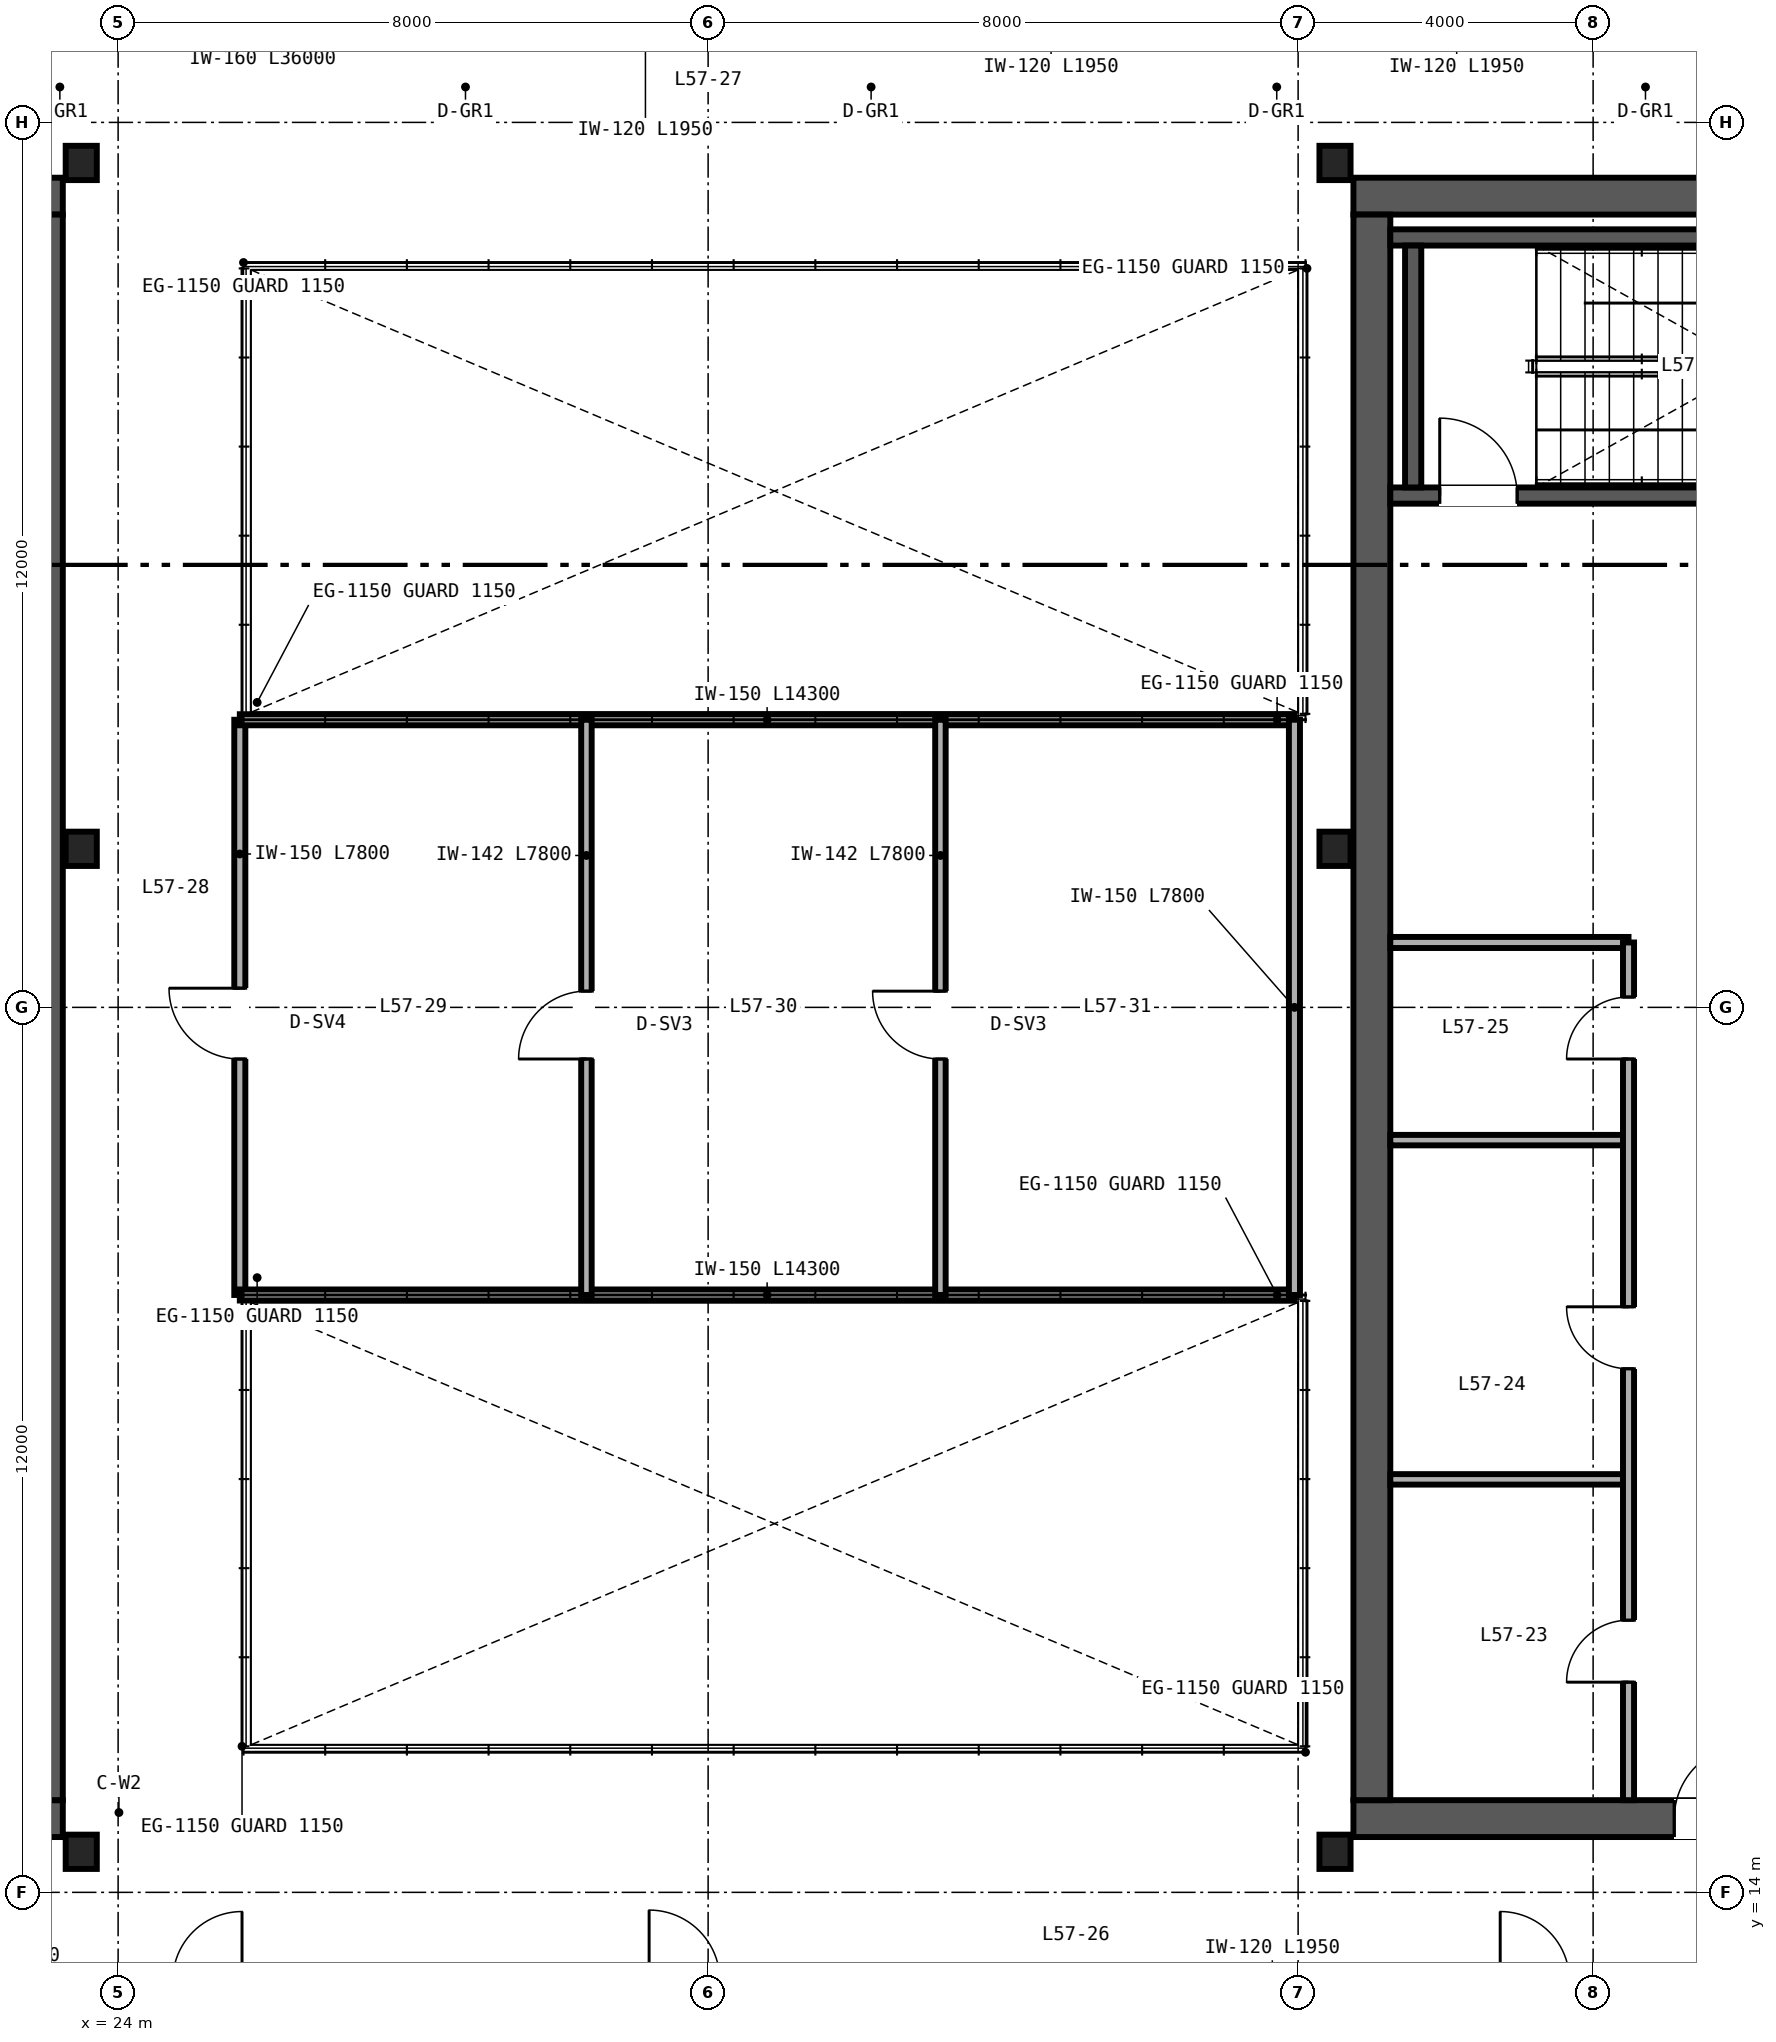
"""IFC4 building model, lengths in metres.
Left out: names, types, materials, properties, quantities, classifications, styles, units other than length and angle.
Written with IfcOpenShell. Run it as: python <this file> out.ifc"""

import sys

from ifc_helpers import new_model, si_unit, direction, frame, frame_2d, origin, origin_2d, place, context, subcontext, project, spatial, rectangle, i_section, extrude, source, transform, mapped, element, fill, save


model = new_model("IFC4")
c1 = context("Model", 3, precision=1e-05, world=origin(), true_north=direction((0.0, 1.0)))
c2 = subcontext(c1, "Body", "Model", "MODEL_VIEW")
j1 = project(units=[si_unit("LENGTHUNIT", "METRE"), si_unit("PLANEANGLEUNIT", "RADIAN")], contexts=[c1])
p1 = place(None, origin())
s1 = spatial("IfcSite", under=j1, at=p1, CompositionType="ELEMENT")
p2 = place(p1, origin())
s2 = spatial("IfcBuilding", under=s1, at=p2, CompositionType="ELEMENT")
p3 = place(p2, frame((0.0, 0.0, 228.0)))
s3 = spatial("IfcBuildingStorey", under=s2, at=p3, CompositionType="ELEMENT", Elevation=228.0)
p4 = place(p3, frame((10.75, 15.0, 0.0), z_axis=(0.0, 0.0, 1.0), x_axis=(1.0, 0.0, 0.0)))
e1 = element("IfcWall", 1, at=p4, inside=s3, PredefinedType="SHEAR", context=c2, shape_type="SweptSolid", body=[
    extrude(rectangle(XDim=12.5, YDim=0.5, at=frame_2d((6.25, 0.0))), origin(), (0.0, 0.0, 1.0), 4.58),
])
p5 = place(p4, frame((10.15, 0.0, 0.0)))
e2 = element("IfcOpeningElement", 2, at=p5, cuts=e1, PredefinedType="OPENING", context=c2, shape_type="SweptSolid", body=[
    extrude(rectangle(XDim=1.0, YDim=2.15, at=frame_2d((0.5, 1.075))), frame((0.0, 0.26, 0.0), z_axis=(0.0, -1.0, 0.0), x_axis=(1.0, 0.0, 0.0)), (0.0, 0.0, 1.0), 0.52),
])
p6 = place(p3, frame((10.75, 37.0, 0.0), z_axis=(0.0, 0.0, 1.0), x_axis=(1.0, 0.0, 0.0)))
e3 = element("IfcWall", 3, at=p6, inside=s3, PredefinedType="SHEAR", context=c2, shape_type="SweptSolid", body=[
    extrude(rectangle(XDim=12.5, YDim=0.5, at=frame_2d((6.25, 0.0))), origin(), (0.0, 0.0, 1.0), 4.58),
])
p7 = place(p6, frame((10.35, 0.0, 0.0)))
e4 = element("IfcOpeningElement", 4, at=p7, cuts=e3, PredefinedType="OPENING", context=c2, shape_type="SweptSolid", body=[
    extrude(rectangle(XDim=1.0, YDim=2.15, at=frame_2d((0.5, 1.075))), frame((0.0, 0.26, 0.0), z_axis=(0.0, -1.0, 0.0), x_axis=(1.0, 0.0, 0.0)), (0.0, 0.0, 1.0), 0.52),
])
p8 = place(p3, frame((23.0, 15.25, 0.0), z_axis=(0.0, 0.0, 1.0), x_axis=(0.0, 1.0, 0.0)))
e5 = element("IfcWall", 5, at=p8, inside=s3, PredefinedType="SHEAR", context=c2, shape_type="SweptSolid", body=[
    extrude(rectangle(XDim=21.5, YDim=0.5, at=frame_2d((10.75, 0.0))), origin(), (0.0, 0.0, 1.0), 4.58),
])
p9 = place(p3, frame((40.75, 15.0, 0.0), z_axis=(0.0, 0.0, 1.0), x_axis=(1.0, 0.0, 0.0)))
e6 = element("IfcWall", 6, at=p9, inside=s3, PredefinedType="SHEAR", context=c2, shape_type="SweptSolid", body=[
    extrude(rectangle(XDim=12.5, YDim=0.5, at=frame_2d((6.25, 0.0))), origin(), (0.0, 0.0, 1.0), 4.58),
])
p10 = place(p9, frame((4.35, 0.0, 0.0)))
e7 = element("IfcOpeningElement", 7, at=p10, cuts=e6, PredefinedType="OPENING", context=c2, shape_type="SweptSolid", body=[
    extrude(rectangle(XDim=1.0, YDim=2.15, at=frame_2d((0.5, 1.075))), frame((0.0, 0.26, 0.0), z_axis=(0.0, -1.0, 0.0), x_axis=(1.0, 0.0, 0.0)), (0.0, 0.0, 1.0), 0.52),
])
p11 = place(p3, frame((40.75, 37.0, 0.0), z_axis=(0.0, 0.0, 1.0), x_axis=(1.0, 0.0, 0.0)))
e8 = element("IfcWall", 8, at=p11, inside=s3, PredefinedType="SHEAR", context=c2, shape_type="SweptSolid", body=[
    extrude(rectangle(XDim=12.5, YDim=0.5, at=frame_2d((6.25, 0.0))), origin(), (0.0, 0.0, 1.0), 4.58),
])
p12 = place(p11, frame((9.95, 0.0, 0.0)))
e9 = element("IfcOpeningElement", 9, at=p12, cuts=e8, PredefinedType="OPENING", context=c2, shape_type="SweptSolid", body=[
    extrude(rectangle(XDim=1.1, YDim=2.15, at=frame_2d((0.55, 1.075))), frame((0.0, 0.26, 0.0), z_axis=(0.0, -1.0, 0.0), x_axis=(1.0, 0.0, 0.0)), (0.0, 0.0, 1.0), 0.52),
])
p13 = place(p3, frame((41.0, 15.25, 0.0), z_axis=(0.0, 0.0, 1.0), x_axis=(0.0, 1.0, 0.0)))
e10 = element("IfcWall", 10, at=p13, inside=s3, PredefinedType="SHEAR", context=c2, shape_type="SweptSolid", body=[
    extrude(rectangle(XDim=21.5, YDim=0.5, at=frame_2d((10.75, 0.0))), origin(), (0.0, 0.0, 1.0), 4.58),
])
p14 = place(p3, frame((41.25, 32.94, 0.0), z_axis=(0.0, 0.0, 1.0), x_axis=(1.0, 0.0, 0.0)))
e11 = element("IfcWall", 11, at=p14, inside=s3, PredefinedType="SHEAR", context=c2, shape_type="SweptSolid", body=[
    extrude(rectangle(XDim=8.06, YDim=0.22, at=frame_2d((4.03, 0.0))), origin(), (0.0, 0.0, 1.0), 4.6),
])
p15 = place(p14, frame((0.67, 0.0, 0.0)))
e12 = element("IfcOpeningElement", 12, at=p15, cuts=e11, PredefinedType="OPENING", context=c2, shape_type="SweptSolid", body=[
    extrude(rectangle(XDim=1.05, YDim=2.15, at=frame_2d((0.525, 1.075))), frame((0.0, 0.12, 0.0), z_axis=(0.0, -1.0, 0.0), x_axis=(1.0, 0.0, 0.0)), (0.0, 0.0, 1.0), 0.24),
])
p16 = place(p3, frame((41.25, 36.44, 0.0), z_axis=(0.0, 0.0, 1.0), x_axis=(1.0, 0.0, 0.0)))
e13 = element("IfcWall", 13, at=p16, inside=s3, PredefinedType="SHEAR", context=c2, shape_type="SweptSolid", body=[
    extrude(rectangle(XDim=8.06, YDim=0.22, at=frame_2d((4.03, 0.0))), origin(), (0.0, 0.0, 1.0), 4.6),
])
p17 = place(p3, frame((41.56, 33.05, 0.0), z_axis=(0.0, 0.0, 1.0), x_axis=(0.0, 1.0, 0.0)))
e14 = element("IfcWall", 14, at=p17, inside=s3, PredefinedType="SHEAR", context=c2, shape_type="SweptSolid", body=[
    extrude(rectangle(XDim=3.28, YDim=0.22, at=frame_2d((1.64, 0.0))), origin(), (0.0, 0.0, 1.0), 4.6),
])
m1 = source(origin(), c2, "Body", "SweptSolid", [
    extrude(i_section(OverallWidth=0.422, OverallDepth=0.465, WebThickness=0.045, FlangeThickness=0.073, FilletRadius=0.025, at=origin_2d()), origin(), (0.0, 0.0, 1.0), 4.58),
])
for number, where, z_axis, x_axis in (
    (15, (23.5, 14.55, 0.0), (0.0, 0.0, 1.0), (1.0, 0.0, 0.0)),
    (16, (40.5, 14.55, 0.0), (0.0, 0.0, 1.0), (1.0, 0.0, 0.0)),
    (17, (23.5, 28.15, 0.0), (0.0, 0.0, 1.0), (1.0, 0.0, 0.0)),
    (18, (40.5, 28.15, 0.0), (0.0, 0.0, 1.0), (1.0, 0.0, 0.0)),
    (19, (23.5, 37.45, 0.0), (0.0, 0.0, 1.0), (1.0, 0.0, 0.0)),
    (20, (40.5, 37.45, 0.0), (0.0, 0.0, 1.0), (1.0, 0.0, 0.0)),
):
    element("IfcColumn", number, at=place(p3, frame(where, z_axis=z_axis, x_axis=x_axis)), inside=s3, PredefinedType="COLUMN", context=c2, shape_type="MappedRepresentation", body=[
        mapped(m1, transform((0.0, 0.0, 0.0), scale=1.0)),
    ])
p18 = place(p3, frame((41.25, 26.88, 0.0), z_axis=(0.0, 0.0, 1.0), x_axis=(1.0, 0.0, 0.0)))
e21 = element("IfcWall", 21, at=p18, inside=s3, PredefinedType="PARTITIONING", context=c2, shape_type="SweptSolid", body=[
    extrude(rectangle(XDim=3.23, YDim=0.15, at=frame_2d((1.615, 0.0))), origin(), (0.0, 0.0, 1.0), 4.58),
])
for number, where, z_axis, x_axis in (
    (22, (41.25, 19.6, 0.0), (0.0, 0.0, 1.0), (1.0, 0.0, 0.0)),
    (23, (41.25, 24.2, 0.0), (0.0, 0.0, 1.0), (1.0, 0.0, 0.0)),
):
    element("IfcWall", number, at=place(p3, frame(where, z_axis=z_axis, x_axis=x_axis)), inside=s3, PredefinedType="PARTITIONING", context=c2, shape_type="SweptSolid", body=[
        extrude(rectangle(XDim=3.23, YDim=0.142, at=frame_2d((1.615, 0.0))), origin(), (0.0, 0.0, 1.0), 4.58),
    ])
p19 = place(p3, frame((44.48, 15.25, 0.0), z_axis=(0.0, 0.0, 1.0), x_axis=(0.0, 1.0, 0.0)))
e24 = element("IfcWall", 24, at=p19, inside=s3, PredefinedType="PARTITIONING", context=c2, shape_type="SweptSolid", body=[
    extrude(rectangle(XDim=11.63, YDim=0.15, at=frame_2d((5.815, 0.0))), origin(), (0.0, 0.0, 1.0), 4.58),
])
p20 = place(p19, frame((1.6, 0.0, 0.0)))
e25 = element("IfcOpeningElement", 25, at=p20, cuts=e24, PredefinedType="OPENING", context=c2, shape_type="SweptSolid", body=[
    extrude(rectangle(XDim=0.84, YDim=2.1, at=frame_2d((0.42, 1.05))), frame((0.0, 0.085, 0.0), z_axis=(0.0, -1.0, 0.0), x_axis=(1.0, 0.0, 0.0)), (0.0, 0.0, 1.0), 0.17),
])
p21 = place(p19, frame((5.85, 0.0, 0.0)))
e26 = element("IfcOpeningElement", 26, at=p21, cuts=e24, PredefinedType="OPENING", context=c2, shape_type="SweptSolid", body=[
    extrude(rectangle(XDim=0.84, YDim=2.1, at=frame_2d((0.42, 1.05))), frame((0.0, 0.085, 0.0), z_axis=(0.0, -1.0, 0.0), x_axis=(1.0, 0.0, 0.0)), (0.0, 0.0, 1.0), 0.17),
])
p22 = place(p19, frame((10.05, 0.0, 0.0)))
e27 = element("IfcOpeningElement", 27, at=p22, cuts=e24, PredefinedType="OPENING", context=c2, shape_type="SweptSolid", body=[
    extrude(rectangle(XDim=0.84, YDim=2.1, at=frame_2d((0.42, 1.05))), frame((0.0, 0.085, 0.0), z_axis=(0.0, -1.0, 0.0), x_axis=(1.0, 0.0, 0.0)), (0.0, 0.0, 1.0), 0.17),
])
p23 = place(p3, frame((25.65, 22.1, 0.0), z_axis=(0.0, 0.0, 1.0), x_axis=(0.0, 1.0, 0.0)))
e28 = element("IfcWall", 28, at=p23, inside=s3, PredefinedType="PARTITIONING", context=c2, shape_type="SweptSolid", body=[
    extrude(rectangle(XDim=7.8, YDim=0.15, at=frame_2d((3.9, 0.0))), origin(), (0.0, 0.0, 1.0), 3.653),
])
p24 = place(p23, frame((3.2, 0.0, 0.0)))
e29 = element("IfcOpeningElement", 29, at=p24, cuts=e28, PredefinedType="OPENING", context=c2, shape_type="SweptSolid", body=[
    extrude(rectangle(XDim=0.96, YDim=2.15, at=frame_2d((0.48, 1.075))), frame((0.0, 0.085, 0.0), z_axis=(0.0, -1.0, 0.0), x_axis=(1.0, 0.0, 0.0)), (0.0, 0.0, 1.0), 0.17),
])
for number, where, z_axis, x_axis in (
    (30, (25.65, 22.1, 0.0), (0.0, 0.0, 1.0), (1.0, 0.0, 0.0)),
    (31, (25.65, 29.9, 0.0), (0.0, 0.0, 1.0), (1.0, 0.0, 0.0)),
):
    element("IfcWall", number, at=place(p3, frame(where, z_axis=z_axis, x_axis=x_axis)), inside=s3, PredefinedType="PARTITIONING", context=c2, shape_type="SweptSolid", body=[
        extrude(rectangle(XDim=14.3, YDim=0.15, at=frame_2d((7.15, 0.0))), origin(), (0.0, 0.0, 1.0), 4.58),
    ])
p25 = place(p3, frame((39.95, 22.1, 0.0), z_axis=(0.0, 0.0, 1.0), x_axis=(0.0, 1.0, 0.0)))
e32 = element("IfcWall", 32, at=p25, inside=s3, PredefinedType="PARTITIONING", context=c2, shape_type="SweptSolid", body=[
    extrude(rectangle(XDim=7.8, YDim=0.15, at=frame_2d((3.9, 0.0))), origin(), (0.0, 0.0, 1.0), 3.653),
])
p26 = place(p3, frame((30.35, 22.1, 0.0), z_axis=(0.0, 0.0, 1.0), x_axis=(0.0, 1.0, 0.0)))
e33 = element("IfcWall", 33, at=p26, inside=s3, PredefinedType="PARTITIONING", context=c2, shape_type="SweptSolid", body=[
    extrude(rectangle(XDim=7.8, YDim=0.142, at=frame_2d((3.9, 0.0))), origin(), (0.0, 0.0, 1.0), 3.653),
])
p27 = place(p26, frame((3.2, 0.0, 0.0)))
e34 = element("IfcOpeningElement", 34, at=p27, cuts=e33, PredefinedType="OPENING", context=c2, shape_type="SweptSolid", body=[
    extrude(rectangle(XDim=0.92, YDim=2.15, at=frame_2d((0.46, 1.075))), frame((0.0, 0.081, 0.0), z_axis=(0.0, -1.0, 0.0), x_axis=(1.0, 0.0, 0.0)), (0.0, 0.0, 1.0), 0.162),
])
p28 = place(p3, frame((35.15, 22.1, 0.0), z_axis=(0.0, 0.0, 1.0), x_axis=(0.0, 1.0, 0.0)))
e35 = element("IfcWall", 35, at=p28, inside=s3, PredefinedType="PARTITIONING", context=c2, shape_type="SweptSolid", body=[
    extrude(rectangle(XDim=7.8, YDim=0.142, at=frame_2d((3.9, 0.0))), origin(), (0.0, 0.0, 1.0), 3.653),
])
p29 = place(p28, frame((3.2, 0.0, 0.0)))
e36 = element("IfcOpeningElement", 36, at=p29, cuts=e35, PredefinedType="OPENING", context=c2, shape_type="SweptSolid", body=[
    extrude(rectangle(XDim=0.92, YDim=2.15, at=frame_2d((0.46, 1.075))), frame((0.0, 0.081, 0.0), z_axis=(0.0, -1.0, 0.0), x_axis=(1.0, 0.0, 0.0)), (0.0, 0.0, 1.0), 0.162),
])
m2 = source(origin(), c2, "Body", "SweptSolid", [
    extrude(rectangle(XDim=1.05, YDim=2.15, at=frame_2d((0.525, 1.075))), frame((0.0, 0.025, 0.0), z_axis=(0.0, -1.0, 0.0), x_axis=(1.0, 0.0, 0.0)), (0.0, 0.0, 1.0), 0.05),
])
p30 = place(p15, origin())
e37 = element("IfcDoor", 37, at=p30, inside=s3, OperationType="SINGLE_SWING_LEFT", PredefinedType="DOOR", context=c2, shape_type="MappedRepresentation", body=[
    mapped(m2, transform((0.0, 0.0, 0.0), scale=1.0)),
])
fill(e12, e37)
m3 = source(origin(), c2, "Body", "SweptSolid", [
    extrude(rectangle(XDim=1.0, YDim=2.15, at=frame_2d((0.5, 1.075))), frame((0.0, 0.025, 0.0), z_axis=(0.0, -1.0, 0.0), x_axis=(1.0, 0.0, 0.0)), (0.0, 0.0, 1.0), 0.05),
])
p31 = place(p10, origin())
e38 = element("IfcDoor", 38, at=p31, inside=s3, OperationType="SINGLE_SWING_RIGHT", PredefinedType="DOOR", context=c2, shape_type="MappedRepresentation", body=[
    mapped(m3, transform((0.0, 0.0, 0.0), scale=1.0)),
])
fill(e7, e38)
m4 = source(origin(), c2, "Body", "SweptSolid", [
    extrude(rectangle(XDim=0.84, YDim=2.1, at=frame_2d((0.42, 1.05))), frame((0.0, 0.025, 0.0), z_axis=(0.0, -1.0, 0.0), x_axis=(1.0, 0.0, 0.0)), (0.0, 0.0, 1.0), 0.05),
])
p32 = place(p20, origin())
e39 = element("IfcDoor", 39, at=p32, inside=s3, OperationType="SINGLE_SWING_LEFT", PredefinedType="DOOR", context=c2, shape_type="MappedRepresentation", body=[
    mapped(m4, transform((0.0, 0.0, 0.0), scale=1.0)),
])
fill(e25, e39)
p33 = place(p21, origin())
e40 = element("IfcDoor", 40, at=p33, inside=s3, OperationType="SINGLE_SWING_RIGHT", PredefinedType="DOOR", context=c2, shape_type="MappedRepresentation", body=[
    mapped(m4, transform((0.0, 0.0, 0.0), scale=1.0)),
])
fill(e26, e40)
p34 = place(p22, origin())
e41 = element("IfcDoor", 41, at=p34, inside=s3, OperationType="SINGLE_SWING_LEFT", PredefinedType="DOOR", context=c2, shape_type="MappedRepresentation", body=[
    mapped(m4, transform((0.0, 0.0, 0.0), scale=1.0)),
])
fill(e27, e41)
m5 = source(origin(), c2, "Body", "SweptSolid", [
    extrude(rectangle(XDim=0.96, YDim=2.15, at=frame_2d((0.48, 1.075))), frame((0.0, 0.025, 0.0), z_axis=(0.0, -1.0, 0.0), x_axis=(1.0, 0.0, 0.0)), (0.0, 0.0, 1.0), 0.05),
])
p35 = place(p24, origin())
e42 = element("IfcDoor", 42, at=p35, inside=s3, OperationType="SINGLE_SWING_RIGHT", PredefinedType="DOOR", context=c2, shape_type="MappedRepresentation", body=[
    mapped(m5, transform((0.0, 0.0, 0.0), scale=1.0)),
])
fill(e29, e42)
m6 = source(origin(), c2, "Body", "SweptSolid", [
    extrude(rectangle(XDim=0.92, YDim=2.15, at=frame_2d((0.46, 1.075))), frame((0.0, 0.025, 0.0), z_axis=(0.0, -1.0, 0.0), x_axis=(1.0, 0.0, 0.0)), (0.0, 0.0, 1.0), 0.05),
])
p36 = place(p27, origin())
e43 = element("IfcDoor", 43, at=p36, inside=s3, OperationType="SINGLE_SWING_LEFT", PredefinedType="DOOR", context=c2, shape_type="MappedRepresentation", body=[
    mapped(m6, transform((0.0, 0.0, 0.0), scale=1.0)),
])
fill(e34, e43)
p37 = place(p29, origin())
e44 = element("IfcDoor", 44, at=p37, inside=s3, OperationType="SINGLE_SWING_RIGHT", PredefinedType="DOOR", context=c2, shape_type="MappedRepresentation", body=[
    mapped(m6, transform((0.0, 0.0, 0.0), scale=1.0)),
])
fill(e36, e44)
save(model, sys.argv[1])
